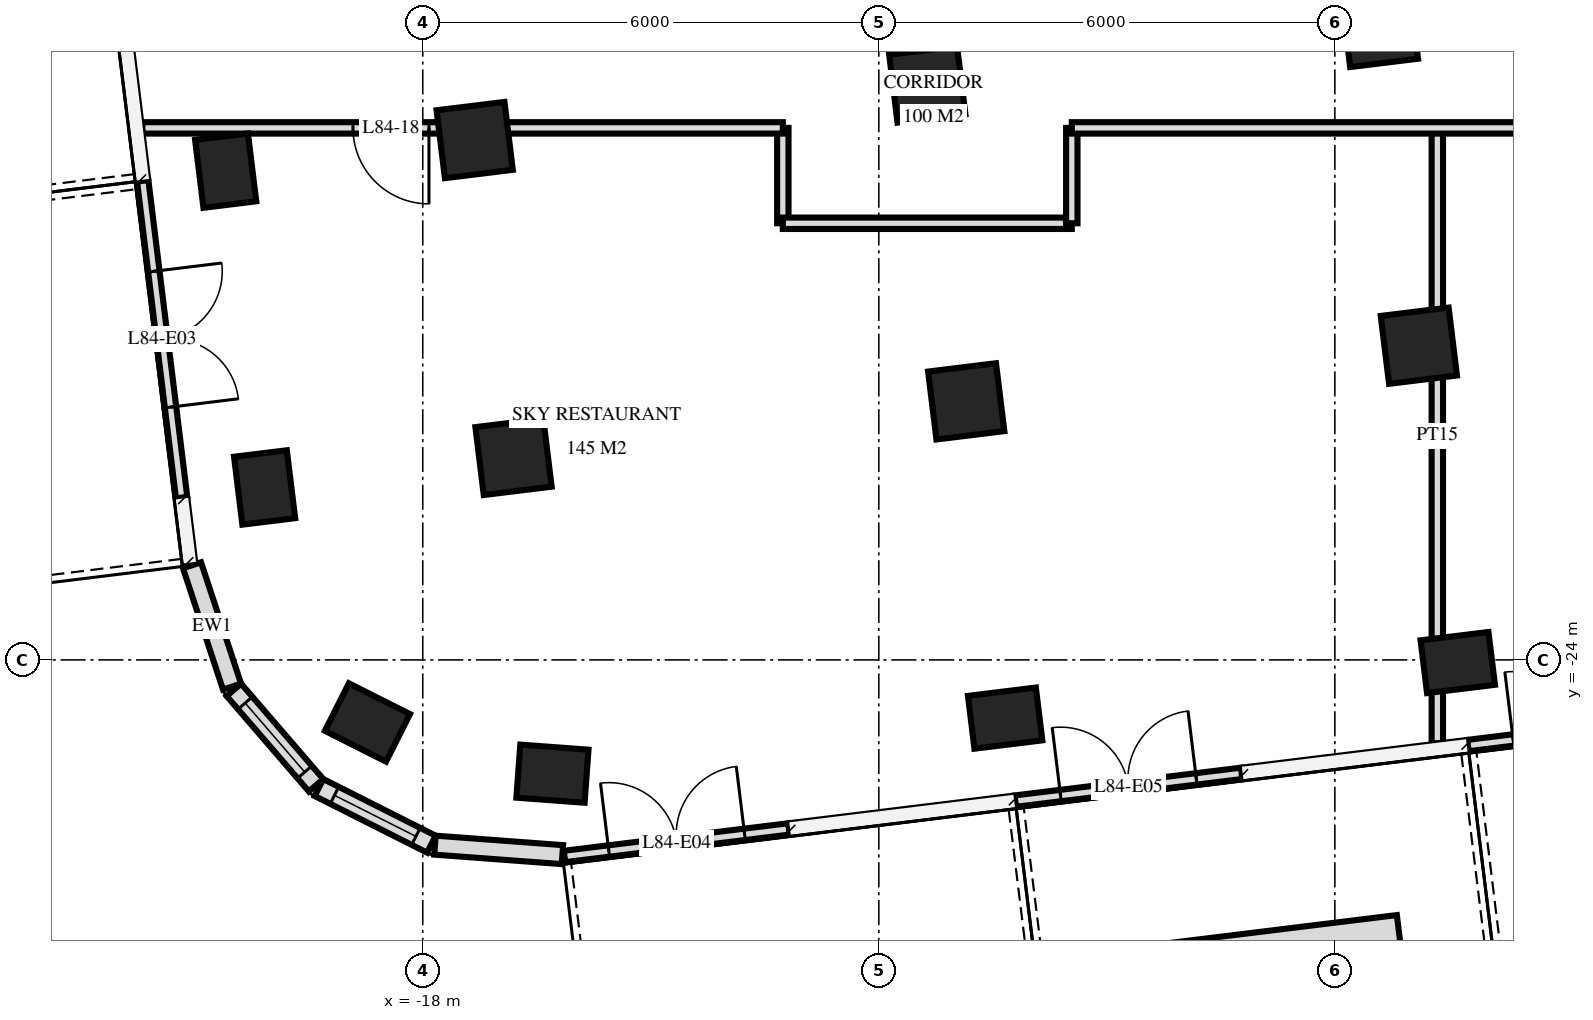
"""IFC4 building model, lengths in metres.
Left out: names, types, materials, properties, quantities, classifications, styles, units other than length and angle.
Written with IfcOpenShell. Run it as: python <this file> out.ifc"""

import sys

from ifc_helpers import new_model, si_unit, direction, frame, frame_2d, origin, origin_2d, place, context, subcontext, project, spatial, rectangle, extrude, element, fill, save


model = new_model("IFC4")
c1 = context("Model", 3, precision=1e-05, world=origin(), true_north=direction((0.0, 1.0)))
c2 = subcontext(c1, "Body", "Model", "MODEL_VIEW")
j1 = project(units=[si_unit("LENGTHUNIT", "METRE"), si_unit("PLANEANGLEUNIT", "RADIAN")], contexts=[c1])
p1 = place(None, origin())
s1 = spatial("IfcSite", under=j1, at=p1, CompositionType="ELEMENT")
p2 = place(p1, origin())
s2 = spatial("IfcBuilding", under=s1, at=p2, CompositionType="ELEMENT")
p3 = place(p2, frame((0.0, 0.0, 318.6)))
s3 = spatial("IfcBuildingStorey", under=s2, at=p3, CompositionType="ELEMENT", Elevation=318.6)
for number, where, z_axis, x_axis in (
    (1, (-20.593, -17.562, 0.0), (0.0, 0.0, 1.0), (-0.122, 0.993, 0.0)),
    (2, (-20.081, -21.731, 0.0), (0.0, 0.0, 1.0), (-0.122, 0.993, 0.0)),
    (3, (-18.728, -24.823, 0.0), (0.0, 0.0, 1.0), (-0.893, 0.45, 0.0)),
):
    element("IfcColumn", number, at=place(p3, frame(where, z_axis=z_axis, x_axis=x_axis)), inside=s3, PredefinedType="COLUMN", context=c2, shape_type="SweptSolid", body=[
        extrude(rectangle(XDim=0.9, YDim=0.7, at=origin_2d()), origin(), (0.0, 0.0, 1.0), 4.0),
    ])
for number, where, z_axis, x_axis in (
    (4, (-17.317, -17.16, 0.0), (0.0, 0.0, 1.0), (0.993, 0.122, 0.0)),
    (5, (-16.806, -21.329, 0.0), (0.0, 0.0, 1.0), (0.993, 0.122, 0.0)),
):
    element("IfcColumn", number, at=place(p3, frame(where, z_axis=z_axis, x_axis=x_axis)), inside=s3, PredefinedType="COLUMN", context=c2, shape_type="SweptSolid", body=[
        extrude(rectangle(XDim=0.9, YDim=0.9, at=origin_2d()), origin(), (0.0, 0.0, 1.0), 4.0),
    ])
p4 = place(p3, frame((-16.294, -25.497, 0.0), z_axis=(0.0, 0.0, 1.0), x_axis=(-0.997251478385, 0.074091084885, 0.0)))
e6 = element("IfcColumn", 6, at=p4, inside=s3, PredefinedType="COLUMN", context=c2, shape_type="SweptSolid", body=[
    extrude(rectangle(XDim=0.9, YDim=0.7, at=origin_2d()), origin(), (0.0, 0.0, 1.0), 4.0),
])
for number, where, z_axis, x_axis in (
    (7, (-11.362, -16.429, 0.0), (0.0, 0.0, 1.0), (0.993, 0.122, 0.0)),
    (8, (-10.85, -20.598, 0.0), (0.0, 0.0, 1.0), (0.993, 0.122, 0.0)),
):
    element("IfcColumn", number, at=place(p3, frame(where, z_axis=z_axis, x_axis=x_axis)), inside=s3, PredefinedType="COLUMN", context=c2, shape_type="SweptSolid", body=[
        extrude(rectangle(XDim=0.9, YDim=0.9, at=origin_2d()), origin(), (0.0, 0.0, 1.0), 4.0),
    ])
p5 = place(p3, frame((-10.338, -24.766, 0.0), z_axis=(0.0, 0.0, 1.0), x_axis=(0.992546151641, 0.121869343405, 0.0)))
e9 = element("IfcColumn", 9, at=p5, inside=s3, PredefinedType="COLUMN", context=c2, shape_type="SweptSolid", body=[
    extrude(rectangle(XDim=0.9, YDim=0.7, at=origin_2d()), origin(), (0.0, 0.0, 1.0), 4.0),
])
for number, where, z_axis, x_axis in (
    (10, (-5.407, -15.698, 0.0), (0.0, 0.0, 1.0), (0.993, 0.122, 0.0)),
    (11, (-4.895, -19.866, 0.0), (0.0, 0.0, 1.0), (0.993, 0.122, 0.0)),
):
    element("IfcColumn", number, at=place(p3, frame(where, z_axis=z_axis, x_axis=x_axis)), inside=s3, PredefinedType="COLUMN", context=c2, shape_type="SweptSolid", body=[
        extrude(rectangle(XDim=0.9, YDim=0.9, at=origin_2d()), origin(), (0.0, 0.0, 1.0), 4.0),
    ])
p6 = place(p3, frame((-4.383, -24.035, 0.0), z_axis=(0.0, 0.0, 1.0), x_axis=(0.992546151641, 0.121869343405, 0.0)))
e12 = element("IfcColumn", 12, at=p6, inside=s3, PredefinedType="COLUMN", context=c2, shape_type="SweptSolid", body=[
    extrude(rectangle(XDim=0.9, YDim=0.7, at=origin_2d()), origin(), (0.0, 0.0, 1.0), 4.0),
])
p7 = place(p3, frame((-21.685, -17.696, 0.0), z_axis=(0.0, 0.0, 1.0), x_axis=(0.121895320106, -0.992542961758, 0.0)))
e13 = element("IfcWall", 13, at=p7, inside=s3, PredefinedType="USERDEFINED", context=c2, shape_type="SweptSolid", body=[
    extrude(rectangle(XDim=4.2, YDim=0.15, at=frame_2d((2.1, 0.0))), origin(), (0.0, 0.0, 1.0), 3.72),
])
p8 = place(p7, frame((1.2, 0.0, 0.0)))
e14 = element("IfcOpeningElement", 14, at=p8, cuts=e13, PredefinedType="OPENING", context=c2, shape_type="SweptSolid", body=[
    extrude(rectangle(XDim=1.8, YDim=2.4, at=frame_2d((0.9, 1.2))), frame((0.0, 0.085, 0.0), z_axis=(0.0, -1.0, 0.0), x_axis=(1.0, 0.0, 0.0)), (0.0, 0.0, 1.0), 0.17),
])
p9 = place(p3, frame((-21.036, -22.755, 0.0), z_axis=(0.0, 0.0, 1.0), x_axis=(0.313046160822, -0.949737911844, 0.0)))
e15 = element("IfcWall", 15, at=p9, inside=s3, PredefinedType="SOLIDWALL", context=c2, shape_type="SweptSolid", body=[
    extrude(rectangle(XDim=1.681, YDim=0.25, at=frame_2d((0.841, 0.0))), origin(), (0.0, 0.0, 1.0), 3.72),
])
p10 = place(p3, frame((-20.485, -24.394, 0.0), z_axis=(0.0, 0.0, 1.0), x_axis=(0.652755886531, -0.757568315466, 0.0)))
e16 = element("IfcWall", 16, at=p10, inside=s3, PredefinedType="SOLIDWALL", context=c2, shape_type="SweptSolid", body=[
    extrude(rectangle(XDim=1.656, YDim=0.25, at=frame_2d((0.828, 0.0))), origin(), (0.0, 0.0, 1.0), 3.72),
])
p11 = place(p10, frame((0.228, 0.0, 0.9)))
e17 = element("IfcOpeningElement", 17, at=p11, cuts=e16, PredefinedType="OPENING", context=c2, shape_type="SweptSolid", body=[
    extrude(rectangle(XDim=1.2, YDim=1.5, at=frame_2d((0.6, 0.75))), frame((0.0, 0.135, 0.0), z_axis=(0.0, -1.0, 0.0), x_axis=(1.0, 0.0, 0.0)), (0.0, 0.0, 1.0), 0.27),
])
p12 = place(p3, frame((-19.366, -25.679, 0.0), z_axis=(0.0, 0.0, 1.0), x_axis=(0.893007580524, -0.450041621549, 0.0)))
e18 = element("IfcWall", 18, at=p12, inside=s3, PredefinedType="SOLIDWALL", context=c2, shape_type="SweptSolid", body=[
    extrude(rectangle(XDim=1.656, YDim=0.25, at=frame_2d((0.828, 0.0))), origin(), (0.0, 0.0, 1.0), 3.72),
])
p13 = place(p12, frame((0.228, 0.0, 0.9)))
e19 = element("IfcOpeningElement", 19, at=p13, cuts=e18, PredefinedType="OPENING", context=c2, shape_type="SweptSolid", body=[
    extrude(rectangle(XDim=1.2, YDim=1.5, at=frame_2d((0.6, 0.75))), frame((0.0, 0.135, 0.0), z_axis=(0.0, -1.0, 0.0), x_axis=(1.0, 0.0, 0.0)), (0.0, 0.0, 1.0), 0.27),
])
p14 = place(p3, frame((-17.84, -26.438, 0.0), z_axis=(0.0, 0.0, 1.0), x_axis=(0.997254267475, -0.074053534713, 0.0)))
e20 = element("IfcWall", 20, at=p14, inside=s3, PredefinedType="SOLIDWALL", context=c2, shape_type="SweptSolid", body=[
    extrude(rectangle(XDim=1.681, YDim=0.25, at=frame_2d((0.841, 0.0))), origin(), (0.0, 0.0, 1.0), 3.72),
])
p15 = place(p3, frame((-16.135, -26.586, 0.0), z_axis=(0.0, 0.0, 1.0), x_axis=(0.992549375183, 0.121843086893, 0.0)))
e21 = element("IfcWall", 21, at=p15, inside=s3, PredefinedType="USERDEFINED", context=c2, shape_type="SweptSolid", body=[
    extrude(rectangle(XDim=2.976, YDim=0.15, at=frame_2d((1.488, 0.0))), origin(), (0.0, 0.0, 1.0), 3.72),
])
p16 = place(p15, frame((0.588, 0.0, 0.0)))
e22 = element("IfcOpeningElement", 22, at=p16, cuts=e21, PredefinedType="OPENING", context=c2, shape_type="SweptSolid", body=[
    extrude(rectangle(XDim=1.8, YDim=2.4, at=frame_2d((0.9, 1.2))), frame((0.0, 0.085, 0.0), z_axis=(0.0, -1.0, 0.0), x_axis=(1.0, 0.0, 0.0)), (0.0, 0.0, 1.0), 0.17),
])
p17 = place(p3, frame((-10.204, -25.858, 0.0), z_axis=(0.0, 0.0, 1.0), x_axis=(0.99255088108, 0.121830819037, 0.0)))
e23 = element("IfcWall", 23, at=p17, inside=s3, PredefinedType="USERDEFINED", context=c2, shape_type="SweptSolid", body=[
    extrude(rectangle(XDim=3.0, YDim=0.15, at=frame_2d((1.5, 0.0))), origin(), (0.0, 0.0, 1.0), 3.72),
])
p18 = place(p17, frame((0.6, 0.0, 0.0)))
e24 = element("IfcOpeningElement", 24, at=p18, cuts=e23, PredefinedType="OPENING", context=c2, shape_type="SweptSolid", body=[
    extrude(rectangle(XDim=1.8, YDim=2.4, at=frame_2d((0.9, 1.2))), frame((0.0, 0.085, 0.0), z_axis=(0.0, -1.0, 0.0), x_axis=(1.0, 0.0, 0.0)), (0.0, 0.0, 1.0), 0.17),
])
p19 = place(p3, frame((-4.249, -25.127, 0.0), z_axis=(0.0, 0.0, 1.0), x_axis=(0.99255088108, 0.121830819037, 0.0)))
e25 = element("IfcWall", 25, at=p19, inside=s3, PredefinedType="USERDEFINED", context=c2, shape_type="SweptSolid", body=[
    extrude(rectangle(XDim=3.0, YDim=0.15, at=frame_2d((1.5, 0.0))), origin(), (0.0, 0.0, 1.0), 3.72),
])
p20 = place(p19, frame((0.6, 0.0, 0.0)))
e26 = element("IfcOpeningElement", 26, at=p20, cuts=e25, PredefinedType="OPENING", context=c2, shape_type="SweptSolid", body=[
    extrude(rectangle(XDim=1.8, YDim=2.4, at=frame_2d((0.9, 1.2))), frame((0.0, 0.085, 0.0), z_axis=(0.0, -1.0, 0.0), x_axis=(1.0, 0.0, 0.0)), (0.0, 0.0, 1.0), 0.17),
])
p21 = place(p3, frame((-5.148, -27.655, 0.0), z_axis=(0.0, 0.0, 1.0), x_axis=(-0.992545758265, -0.121872547154, 0.0)))
e27 = element("IfcWall", 27, at=p21, inside=s3, PredefinedType="USERDEFINED", context=c2, shape_type="SweptSolid", body=[
    extrude(rectangle(XDim=3.6, YDim=0.6, at=frame_2d((1.8, 0.0))), origin(), (0.0, 0.0, 1.0), 0.65),
])
p22 = place(p3, frame((-4.652, -25.096, 0.0), z_axis=(0.0, 0.0, 1.0), x_axis=(0.0, 1.0, 0.0)))
e28 = element("IfcWall", 28, at=p22, inside=s3, PredefinedType="PARTITIONING", context=c2, shape_type="SweptSolid", body=[
    extrude(rectangle(XDim=8.096, YDim=0.15, at=frame_2d((4.048, 0.0))), origin(), (0.0, 0.0, 1.0), 3.72),
])
for number, where, z_axis, x_axis in (
    (29, (-9.461, -18.255, 0.0), (0.0, 0.0, 1.0), (0.0, 1.0, 0.0)),
    (30, (-13.263, -18.255, 0.0), (0.0, 0.0, 1.0), (0.0, 1.0, 0.0)),
):
    element("IfcWall", number, at=place(p3, frame(where, z_axis=z_axis, x_axis=x_axis)), inside=s3, PredefinedType="PARTITIONING", context=c2, shape_type="SweptSolid", body=[
        extrude(rectangle(XDim=1.255, YDim=0.15, at=frame_2d((0.627, 0.0))), origin(), (0.0, 0.0, 1.0), 3.72),
    ])
p23 = place(p3, frame((-13.263, -18.255, 0.0), z_axis=(0.0, 0.0, 1.0), x_axis=(1.0, 0.0, 0.0)))
e31 = element("IfcWall", 31, at=p23, inside=s3, PredefinedType="PARTITIONING", context=c2, shape_type="SweptSolid", body=[
    extrude(rectangle(XDim=3.802, YDim=0.15, at=frame_2d((1.901, 0.0))), origin(), (0.0, 0.0, 1.0), 3.72),
])
p24 = place(p3, frame((-21.689, -17.0, 0.0), z_axis=(0.0, 0.0, 1.0), x_axis=(1.0, 0.0, 0.0)))
e32 = element("IfcWall", 32, at=p24, inside=s3, PredefinedType="PARTITIONING", context=c2, shape_type="SweptSolid", body=[
    extrude(rectangle(XDim=8.427, YDim=0.15, at=frame_2d((4.213, 0.0))), origin(), (0.0, 0.0, 1.0), 3.72),
])
p25 = place(p24, frame((2.771, 0.0, 0.0)))
e33 = element("IfcOpeningElement", 33, at=p25, cuts=e32, PredefinedType="OPENING", context=c2, shape_type="SweptSolid", body=[
    extrude(rectangle(XDim=1.0, YDim=2.1, at=frame_2d((0.5, 1.05))), frame((0.0, 0.085, 0.0), z_axis=(0.0, -1.0, 0.0), x_axis=(1.0, 0.0, 0.0)), (0.0, 0.0, 1.0), 0.17),
])
p26 = place(p3, frame((-9.461, -17.0, 0.0), z_axis=(0.0, 0.0, 1.0), x_axis=(1.0, 0.0, 0.0)))
e34 = element("IfcWall", 34, at=p26, inside=s3, PredefinedType="PARTITIONING", context=c2, shape_type="SweptSolid", body=[
    extrude(rectangle(XDim=32.747, YDim=0.15, at=frame_2d((16.373, 0.0))), origin(), (0.0, 0.0, 1.0), 3.72),
])
p27 = place(p26, frame((9.389, 0.0, 0.0)))
e35 = element("IfcOpeningElement", 35, at=p27, cuts=e34, PredefinedType="OPENING", context=c2, shape_type="SweptSolid", body=[
    extrude(rectangle(XDim=1.0, YDim=2.1, at=frame_2d((0.5, 1.05))), frame((0.0, 0.085, 0.0), z_axis=(0.0, -1.0, 0.0), x_axis=(1.0, 0.0, 0.0)), (0.0, 0.0, 1.0), 0.17),
])
p28 = place(p26, frame((18.439, 0.0, 0.0)))
e36 = element("IfcOpeningElement", 36, at=p28, cuts=e34, PredefinedType="OPENING", context=c2, shape_type="SweptSolid", body=[
    extrude(rectangle(XDim=1.0, YDim=2.1, at=frame_2d((0.5, 1.05))), frame((0.0, 0.085, 0.0), z_axis=(0.0, -1.0, 0.0), x_axis=(1.0, 0.0, 0.0)), (0.0, 0.0, 1.0), 0.17),
])
p29 = place(p26, frame((24.939, 0.0, 0.0)))
e37 = element("IfcOpeningElement", 37, at=p29, cuts=e34, PredefinedType="OPENING", context=c2, shape_type="SweptSolid", body=[
    extrude(rectangle(XDim=1.0, YDim=2.1, at=frame_2d((0.5, 1.05))), frame((0.0, 0.085, 0.0), z_axis=(0.0, -1.0, 0.0), x_axis=(1.0, 0.0, 0.0)), (0.0, 0.0, 1.0), 0.17),
])
p30 = place(p26, frame((29.958, 0.0, 0.0)))
e38 = element("IfcOpeningElement", 38, at=p30, cuts=e34, PredefinedType="OPENING", context=c2, shape_type="SweptSolid", body=[
    extrude(rectangle(XDim=1.0, YDim=2.1, at=frame_2d((0.5, 1.05))), frame((0.0, 0.085, 0.0), z_axis=(0.0, -1.0, 0.0), x_axis=(1.0, 0.0, 0.0)), (0.0, 0.0, 1.0), 0.17),
])
p31 = place(p8, origin())
e39 = element("IfcDoor", 39, at=p31, inside=s3, OperationType="DOUBLE_DOOR_SINGLE_SWING", PredefinedType="DOOR", context=c2, shape_type="SweptSolid", body=[
    extrude(rectangle(XDim=1.8, YDim=2.4, at=frame_2d((0.9, 1.2))), frame((0.0, 0.025, 0.0), z_axis=(0.0, -1.0, 0.0), x_axis=(1.0, 0.0, 0.0)), (0.0, 0.0, 1.0), 0.05),
])
fill(e14, e39)
p32 = place(p11, origin())
e40 = element("IfcWindow", 40, at=p32, inside=s3, PartitioningType="SINGLE_PANEL", PredefinedType="WINDOW", context=c2, shape_type="SweptSolid", body=[
    extrude(rectangle(XDim=1.2, YDim=1.5, at=frame_2d((0.6, 0.75))), frame((0.0, 0.03, 0.0), z_axis=(0.0, -1.0, 0.0), x_axis=(1.0, 0.0, 0.0)), (0.0, 0.0, 1.0), 0.06),
])
fill(e17, e40)
p33 = place(p13, origin())
e41 = element("IfcWindow", 41, at=p33, inside=s3, PartitioningType="SINGLE_PANEL", PredefinedType="WINDOW", context=c2, shape_type="SweptSolid", body=[
    extrude(rectangle(XDim=1.2, YDim=1.5, at=frame_2d((0.6, 0.75))), frame((0.0, 0.03, 0.0), z_axis=(0.0, -1.0, 0.0), x_axis=(1.0, 0.0, 0.0)), (0.0, 0.0, 1.0), 0.06),
])
fill(e19, e41)
p34 = place(p16, origin())
e42 = element("IfcDoor", 42, at=p34, inside=s3, OperationType="DOUBLE_DOOR_SINGLE_SWING", PredefinedType="DOOR", context=c2, shape_type="SweptSolid", body=[
    extrude(rectangle(XDim=1.8, YDim=2.4, at=frame_2d((0.9, 1.2))), frame((0.0, 0.025, 0.0), z_axis=(0.0, -1.0, 0.0), x_axis=(1.0, 0.0, 0.0)), (0.0, 0.0, 1.0), 0.05),
])
fill(e22, e42)
p35 = place(p18, origin())
e43 = element("IfcDoor", 43, at=p35, inside=s3, OperationType="DOUBLE_DOOR_SINGLE_SWING", PredefinedType="DOOR", context=c2, shape_type="SweptSolid", body=[
    extrude(rectangle(XDim=1.8, YDim=2.4, at=frame_2d((0.9, 1.2))), frame((0.0, 0.025, 0.0), z_axis=(0.0, -1.0, 0.0), x_axis=(1.0, 0.0, 0.0)), (0.0, 0.0, 1.0), 0.05),
])
fill(e24, e43)
p36 = place(p20, origin())
e44 = element("IfcDoor", 44, at=p36, inside=s3, OperationType="DOUBLE_DOOR_SINGLE_SWING", PredefinedType="DOOR", context=c2, shape_type="SweptSolid", body=[
    extrude(rectangle(XDim=1.8, YDim=2.4, at=frame_2d((0.9, 1.2))), frame((0.0, 0.025, 0.0), z_axis=(0.0, -1.0, 0.0), x_axis=(1.0, 0.0, 0.0)), (0.0, 0.0, 1.0), 0.05),
])
fill(e26, e44)
p37 = place(p25, frame((0.5, 0.0, 0.0), z_axis=(0.0, 0.0, 1.0), x_axis=(-1.0, 0.0, 0.0)))
e45 = element("IfcDoor", 45, at=p37, inside=s3, OperationType="SINGLE_SWING_RIGHT", PredefinedType="DOOR", context=c2, shape_type="SweptSolid", body=[
    extrude(rectangle(XDim=1.0, YDim=2.1, at=frame_2d((0.0, 1.05))), frame((0.0, -0.025, 0.0), z_axis=(0.0, 1.0, 0.0), x_axis=(-1.0, 0.0, 0.0)), (0.0, 0.0, 1.0), 0.05),
])
fill(e33, e45)
save(model, sys.argv[1])
